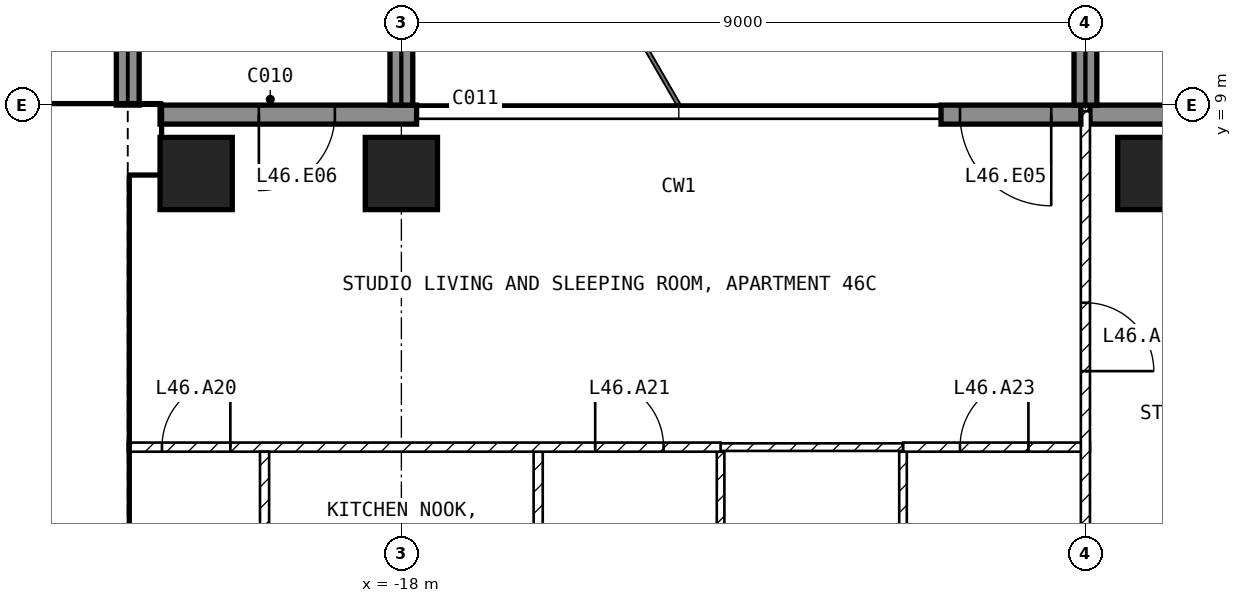
"""IFC4 building model, lengths in metres.
Left out: names, types, materials, properties, quantities, classifications, styles, units other than length and angle.
Written with IfcOpenShell. Run it as: python <this file> out.ifc"""

import sys

from ifc_helpers import new_model, si_unit, direction, frame, frame_2d, origin, origin_2d, place, context, subcontext, project, spatial, rectangle, extrude, element, fill, save


model = new_model("IFC4")
c1 = context("Model", 3, precision=1e-05, world=origin(), true_north=direction((0.0, 1.0)))
c2 = subcontext(c1, "Body", "Model", "MODEL_VIEW")
j1 = project(units=[si_unit("LENGTHUNIT", "METRE"), si_unit("PLANEANGLEUNIT", "RADIAN")], contexts=[c1])
p1 = place(None, origin())
s1 = spatial("IfcSite", under=j1, at=p1, CompositionType="ELEMENT")
p2 = place(p1, origin())
s2 = spatial("IfcBuilding", under=s1, at=p2, CompositionType="ELEMENT")
p3 = place(p2, frame((0.0, 0.0, 187.6)))
s3 = spatial("IfcBuildingStorey", under=s2, at=p3, CompositionType="ELEMENT", Elevation=187.6)
for number, where, z_axis, x_axis in (
    (1, (-20.7, 8.1, -0.25), (0.0, 0.0, 1.0), (1.0, 0.0, 0.0)),
    (2, (-18.0, 8.1, -0.25), (0.0, 0.0, 1.0), (1.0, 0.0, 0.0)),
    (3, (-8.1, 8.1, -0.25), (0.0, 0.0, 1.0), (1.0, 0.0, 0.0)),
):
    element("IfcColumn", number, at=place(p3, frame(where, z_axis=z_axis, x_axis=x_axis)), inside=s3, PredefinedType="COLUMN", context=c2, shape_type="SweptSolid", body=[
        extrude(rectangle(XDim=0.95, YDim=0.95, at=origin_2d()), origin(), (0.0, 0.0, 1.0), 3.5),
    ])
p4 = place(p3, frame((-5.825, 8.875, 0.0), z_axis=(0.0, 0.0, 1.0), x_axis=(-1.0, 0.0, 0.0)))
e4 = element("IfcWall", 4, at=p4, inside=s3, PredefinedType="SOLIDWALL", context=c2, shape_type="SweptSolid", body=[
    extrude(rectangle(XDim=3.115, YDim=0.25, at=frame_2d((1.558, 0.0))), origin(), (0.0, 0.0, 1.0), 3.25),
])
p5 = place(p4, frame((0.25, 0.0, 0.0)))
e5 = element("IfcOpeningElement", 5, at=p5, cuts=e4, PredefinedType="OPENING", context=c2, shape_type="SweptSolid", body=[
    extrude(rectangle(XDim=1.2, YDim=2.4, at=frame_2d((0.6, 1.2))), frame((0.0, 0.135, 0.0), z_axis=(0.0, -1.0, 0.0), x_axis=(1.0, 0.0, 0.0)), (0.0, 0.0, 1.0), 0.27),
])
p6 = place(p3, frame((-9.06, 8.875, 0.0), z_axis=(0.0, 0.0, 1.0), x_axis=(-1.0, 0.0, 0.0)))
e6 = element("IfcWall", 6, at=p6, inside=s3, PredefinedType="SOLIDWALL", context=c2, shape_type="SweptSolid", body=[
    extrude(rectangle(XDim=1.84, YDim=0.25, at=frame_2d((0.92, 0.0))), origin(), (0.0, 0.0, 1.0), 3.25),
])
p7 = place(p6, frame((0.39, 0.0, 0.0)))
e7 = element("IfcOpeningElement", 7, at=p7, cuts=e6, PredefinedType="OPENING", context=c2, shape_type="SweptSolid", body=[
    extrude(rectangle(XDim=1.2, YDim=2.4, at=frame_2d((0.6, 1.2))), frame((0.0, 0.135, 0.0), z_axis=(0.0, -1.0, 0.0), x_axis=(1.0, 0.0, 0.0)), (0.0, 0.0, 1.0), 0.27),
])
p8 = place(p3, frame((-17.8, 8.875, 0.0), z_axis=(0.0, 0.0, 1.0), x_axis=(-1.0, 0.0, 0.0)))
e8 = element("IfcWall", 8, at=p8, inside=s3, PredefinedType="SOLIDWALL", context=c2, shape_type="SweptSolid", body=[
    extrude(rectangle(XDim=3.375, YDim=0.25, at=frame_2d((1.688, 0.0))), origin(), (0.0, 0.0, 1.0), 3.25),
])
p9 = place(p8, frame((1.075, 0.0, 0.0)))
e9 = element("IfcOpeningElement", 9, at=p9, cuts=e8, PredefinedType="OPENING", context=c2, shape_type="SweptSolid", body=[
    extrude(rectangle(XDim=1.0, YDim=2.4, at=frame_2d((0.5, 1.2))), frame((0.0, 0.135, 0.0), z_axis=(0.0, -1.0, 0.0), x_axis=(1.0, 0.0, 0.0)), (0.0, 0.0, 1.0), 0.27),
])
for number, where, z_axis, x_axis in (
    (10, (-21.6, 9.0, 0.0), (0.0, 0.0, 1.0), (0.0, 1.0, 0.0)),
    (11, (-18.0, 9.0, 0.0), (0.0, 0.0, 1.0), (0.0, 1.0, 0.0)),
    (12, (-9.0, 9.0, 0.0), (0.0, 0.0, 1.0), (0.0, 1.0, 0.0)),
):
    element("IfcWall", number, at=place(p3, frame(where, z_axis=z_axis, x_axis=x_axis)), inside=s3, PredefinedType="SOLIDWALL", context=c2, shape_type="SweptSolid", body=[
        extrude(rectangle(XDim=2.7, YDim=0.3, at=frame_2d((1.35, 0.0))), origin(), (0.0, 0.0, 1.0), 3.25),
    ])
p10 = place(p3, frame((-29.6, 8.55, 0.0), z_axis=(0.0, 0.0, 1.0), x_axis=(1.0, 0.0, 0.0)))
e13 = element("IfcWall", 13, at=p10, inside=s3, PredefinedType="SHEAR", context=c2, shape_type="SweptSolid", body=[
    extrude(rectangle(XDim=8.425, YDim=0.9, at=frame_2d((4.212, 0.0))), origin(), (0.0, 0.0, 1.0), 3.25),
])
p11 = place(p3, frame((-21.825, 1.2, 0.0), z_axis=(0.0, 0.0, 1.0), x_axis=(0.0, 1.0, 0.0)))
e14 = element("IfcWall", 14, at=p11, inside=s3, PredefinedType="SHEAR", context=c2, shape_type="SweptSolid", body=[
    extrude(rectangle(XDim=6.9, YDim=0.45, at=frame_2d((3.45, 0.0))), origin(), (0.0, 0.0, 1.0), 3.25),
])
p12 = place(p3, frame((-28.35, 5.15, 0.0), z_axis=(0.0, 0.0, 1.0), x_axis=(1.0, 0.0, 0.0)))
e15 = element("IfcWall", 15, at=p12, inside=s3, PredefinedType="SOLIDWALL", context=c2, shape_type="SweptSolid", body=[
    extrude(rectangle(XDim=6.3, YDim=0.2, at=frame_2d((3.15, 0.0))), origin(), (0.0, 0.0, 1.0), 3.25),
])
p13 = place(p12, frame((5.1, 0.0, 0.0)))
e16 = element("IfcOpeningElement", 16, at=p13, cuts=e15, PredefinedType="OPENING", context=c2, shape_type="SweptSolid", body=[
    extrude(rectangle(XDim=1.0, YDim=2.1, at=frame_2d((0.5, 1.05))), frame((0.0, 0.11, 0.0), z_axis=(0.0, -1.0, 0.0), x_axis=(1.0, 0.0, 0.0)), (0.0, 0.0, 1.0), 0.22),
])
p14 = place(p3, frame((-11.4, 1.3, 0.0), z_axis=(0.0, 0.0, 1.0), x_axis=(0.0, 1.0, 0.0)))
e17 = element("IfcWall", 17, at=p14, inside=s3, PredefinedType="PARTITIONING", context=c2, shape_type="SweptSolid", body=[
    extrude(rectangle(XDim=3.14, YDim=0.1, at=frame_2d((1.57, 0.0))), origin(), (0.0, 0.0, 1.0), 3.25),
])
p15 = place(p3, frame((-11.4, 4.5, 0.0), z_axis=(0.0, 0.0, 1.0), x_axis=(1.0, 0.0, 0.0)))
e18 = element("IfcWall", 18, at=p15, inside=s3, PredefinedType="PARTITIONING", context=c2, shape_type="SweptSolid", body=[
    extrude(rectangle(XDim=2.46, YDim=0.12, at=frame_2d((1.23, 0.0))), origin(), (0.0, 0.0, 1.0), 3.25),
])
p16 = place(p15, frame((0.75, 0.0, 0.0)))
e19 = element("IfcOpeningElement", 19, at=p16, cuts=e18, PredefinedType="OPENING", context=c2, shape_type="SweptSolid", body=[
    extrude(rectangle(XDim=0.9, YDim=2.1, at=frame_2d((0.45, 1.05))), frame((0.0, 0.07, 0.0), z_axis=(0.0, -1.0, 0.0), x_axis=(1.0, 0.0, 0.0)), (0.0, 0.0, 1.0), 0.14),
])
p17 = place(p3, frame((-9.0, 8.92, 0.0), z_axis=(0.0, 0.0, 1.0), x_axis=(0.0, -1.0, 0.0)))
e20 = element("IfcWall", 20, at=p17, inside=s3, PredefinedType="PARTITIONING", context=c2, shape_type="SweptSolid", body=[
    extrude(rectangle(XDim=7.62, YDim=0.12, at=frame_2d((3.81, 0.0))), origin(), (0.0, 0.0, 1.0), 3.25),
])
p18 = place(p17, frame((2.52, 0.0, 0.0)))
e21 = element("IfcOpeningElement", 21, at=p18, cuts=e20, PredefinedType="OPENING", context=c2, shape_type="SweptSolid", body=[
    extrude(rectangle(XDim=0.9, YDim=2.1, at=frame_2d((0.45, 1.05))), frame((0.0, 0.07, 0.0), z_axis=(0.0, -1.0, 0.0), x_axis=(1.0, 0.0, 0.0)), (0.0, 0.0, 1.0), 0.14),
])
p19 = place(p3, frame((-13.8, 1.3, 0.0), z_axis=(0.0, 0.0, 1.0), x_axis=(0.0, 1.0, 0.0)))
e22 = element("IfcWall", 22, at=p19, inside=s3, PredefinedType="PARTITIONING", context=c2, shape_type="SweptSolid", body=[
    extrude(rectangle(XDim=3.14, YDim=0.1, at=frame_2d((1.57, 0.0))), origin(), (0.0, 0.0, 1.0), 3.25),
])
p20 = place(p19, frame((1.145, 0.0, 0.0)))
e23 = element("IfcOpeningElement", 23, at=p20, cuts=e22, PredefinedType="OPENING", context=c2, shape_type="SweptSolid", body=[
    extrude(rectangle(XDim=0.85, YDim=2.1, at=frame_2d((0.425, 1.05))), frame((0.0, 0.06, 0.0), z_axis=(0.0, -1.0, 0.0), x_axis=(1.0, 0.0, 0.0)), (0.0, 0.0, 1.0), 0.12),
])
p21 = place(p3, frame((-13.8, 4.5, 0.0), z_axis=(0.0, 0.0, 1.0), x_axis=(1.0, 0.0, 0.0)))
e24 = element("IfcWall", 24, at=p21, inside=s3, PredefinedType="PARTITIONING", context=c2, shape_type="SweptSolid", body=[
    extrude(rectangle(XDim=2.4, YDim=0.1, at=frame_2d((1.2, 0.0))), origin(), (0.0, 0.0, 1.0), 3.25),
])
p22 = place(p3, frame((-16.2, 1.3, 0.0), z_axis=(0.0, 0.0, 1.0), x_axis=(0.0, 1.0, 0.0)))
e25 = element("IfcWall", 25, at=p22, inside=s3, PredefinedType="PARTITIONING", context=c2, shape_type="SweptSolid", body=[
    extrude(rectangle(XDim=3.14, YDim=0.12, at=frame_2d((1.57, 0.0))), origin(), (0.0, 0.0, 1.0), 3.25),
])
p23 = place(p22, frame((1.12, 0.0, 0.0)))
e26 = element("IfcOpeningElement", 26, at=p23, cuts=e25, PredefinedType="OPENING", context=c2, shape_type="SweptSolid", body=[
    extrude(rectangle(XDim=0.9, YDim=2.1, at=frame_2d((0.45, 1.05))), frame((0.0, 0.07, 0.0), z_axis=(0.0, -1.0, 0.0), x_axis=(1.0, 0.0, 0.0)), (0.0, 0.0, 1.0), 0.14),
])
p24 = place(p3, frame((-21.6, 4.5, 0.0), z_axis=(0.0, 0.0, 1.0), x_axis=(1.0, 0.0, 0.0)))
e27 = element("IfcWall", 27, at=p24, inside=s3, PredefinedType="PARTITIONING", context=c2, shape_type="SweptSolid", body=[
    extrude(rectangle(XDim=7.8, YDim=0.12, at=frame_2d((3.9, 0.0))), origin(), (0.0, 0.0, 1.0), 3.25),
])
p25 = place(p24, frame((0.45, 0.0, 0.0)))
e28 = element("IfcOpeningElement", 28, at=p25, cuts=e27, PredefinedType="OPENING", context=c2, shape_type="SweptSolid", body=[
    extrude(rectangle(XDim=0.9, YDim=2.1, at=frame_2d((0.45, 1.05))), frame((0.0, 0.07, 0.0), z_axis=(0.0, -1.0, 0.0), x_axis=(1.0, 0.0, 0.0)), (0.0, 0.0, 1.0), 0.14),
])
p26 = place(p24, frame((6.15, 0.0, 0.0)))
e29 = element("IfcOpeningElement", 29, at=p26, cuts=e27, PredefinedType="OPENING", context=c2, shape_type="SweptSolid", body=[
    extrude(rectangle(XDim=0.9, YDim=2.1, at=frame_2d((0.45, 1.05))), frame((0.0, 0.07, 0.0), z_axis=(0.0, -1.0, 0.0), x_axis=(1.0, 0.0, 0.0)), (0.0, 0.0, 1.0), 0.14),
])
p27 = place(p3, frame((-19.8, 1.3, 0.0), z_axis=(0.0, 0.0, 1.0), x_axis=(0.0, 1.0, 0.0)))
e30 = element("IfcWall", 30, at=p27, inside=s3, PredefinedType="PARTITIONING", context=c2, shape_type="SweptSolid", body=[
    extrude(rectangle(XDim=3.14, YDim=0.12, at=frame_2d((1.57, 0.0))), origin(), (0.0, 0.0, 1.0), 3.25),
])
p28 = place(p7, origin())
e31 = element("IfcDoor", 31, at=p28, inside=s3, OperationType="SINGLE_SWING_LEFT", PredefinedType="DOOR", context=c2, shape_type="SweptSolid", body=[
    extrude(rectangle(XDim=1.2, YDim=2.4, at=frame_2d((0.6, 1.2))), frame((0.0, 0.025, 0.0), z_axis=(0.0, -1.0, 0.0), x_axis=(1.0, 0.0, 0.0)), (0.0, 0.0, 1.0), 0.05),
])
fill(e7, e31)
p29 = place(p9, origin())
e32 = element("IfcDoor", 32, at=p29, inside=s3, OperationType="SINGLE_SWING_RIGHT", PredefinedType="DOOR", context=c2, shape_type="SweptSolid", body=[
    extrude(rectangle(XDim=1.0, YDim=2.4, at=frame_2d((0.5, 1.2))), frame((0.0, 0.025, 0.0), z_axis=(0.0, -1.0, 0.0), x_axis=(1.0, 0.0, 0.0)), (0.0, 0.0, 1.0), 0.05),
])
fill(e9, e32)
p30 = place(p13, origin())
e33 = element("IfcDoor", 33, at=p30, inside=s3, OperationType="SINGLE_SWING_LEFT", PredefinedType="DOOR", context=c2, shape_type="SweptSolid", body=[
    extrude(rectangle(XDim=1.0, YDim=2.1, at=frame_2d((0.5, 1.05))), frame((0.0, 0.025, 0.0), z_axis=(0.0, -1.0, 0.0), x_axis=(1.0, 0.0, 0.0)), (0.0, 0.0, 1.0), 0.05),
])
fill(e16, e33)
p31 = place(p25, origin())
e34 = element("IfcDoor", 34, at=p31, inside=s3, OperationType="SINGLE_SWING_RIGHT", PredefinedType="DOOR", context=c2, shape_type="SweptSolid", body=[
    extrude(rectangle(XDim=0.9, YDim=2.1, at=frame_2d((0.45, 1.05))), frame((0.0, 0.025, 0.0), z_axis=(0.0, -1.0, 0.0), x_axis=(1.0, 0.0, 0.0)), (0.0, 0.0, 1.0), 0.05),
])
fill(e28, e34)
p32 = place(p26, origin())
e35 = element("IfcDoor", 35, at=p32, inside=s3, OperationType="SINGLE_SWING_LEFT", PredefinedType="DOOR", context=c2, shape_type="SweptSolid", body=[
    extrude(rectangle(XDim=0.9, YDim=2.1, at=frame_2d((0.45, 1.05))), frame((0.0, 0.025, 0.0), z_axis=(0.0, -1.0, 0.0), x_axis=(1.0, 0.0, 0.0)), (0.0, 0.0, 1.0), 0.05),
])
fill(e29, e35)
p33 = place(p18, origin())
e36 = element("IfcDoor", 36, at=p33, inside=s3, OperationType="SINGLE_SWING_RIGHT", PredefinedType="DOOR", context=c2, shape_type="SweptSolid", body=[
    extrude(rectangle(XDim=0.9, YDim=2.1, at=frame_2d((0.45, 1.05))), frame((0.0, 0.025, 0.0), z_axis=(0.0, -1.0, 0.0), x_axis=(1.0, 0.0, 0.0)), (0.0, 0.0, 1.0), 0.05),
])
fill(e21, e36)
p34 = place(p16, origin())
e37 = element("IfcDoor", 37, at=p34, inside=s3, OperationType="SINGLE_SWING_RIGHT", PredefinedType="DOOR", context=c2, shape_type="SweptSolid", body=[
    extrude(rectangle(XDim=0.9, YDim=2.1, at=frame_2d((0.45, 1.05))), frame((0.0, 0.025, 0.0), z_axis=(0.0, -1.0, 0.0), x_axis=(1.0, 0.0, 0.0)), (0.0, 0.0, 1.0), 0.05),
])
fill(e19, e37)
save(model, sys.argv[1])
